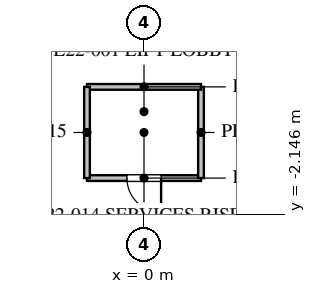
"""IFC4 building model, lengths in metres.
Left out: names, types, materials, properties, quantities, classifications, styles, units other than length and angle.
Written with IfcOpenShell. Run it as: python <this file> out.ifc"""

import sys

from ifc_helpers import new_model, si_unit, direction, frame, frame_2d, origin, place, context, subcontext, project, spatial, rectangle, extrude, element, fill, save


model = new_model("IFC4")
c1 = context("Model", 3, precision=1e-05, world=origin(), true_north=direction((0.0, 1.0)))
c2 = subcontext(c1, "Body", "Model", "MODEL_VIEW")
j1 = project(units=[si_unit("LENGTHUNIT", "METRE"), si_unit("PLANEANGLEUNIT", "RADIAN")], contexts=[c1])
p1 = place(None, origin())
s1 = spatial("IfcSite", under=j1, at=p1, CompositionType="ELEMENT")
p2 = place(p1, origin())
s2 = spatial("IfcBuilding", under=s1, at=p2, CompositionType="ELEMENT")
p3 = place(p2, frame((0.0, 0.0, 98.1)))
s3 = spatial("IfcBuildingStorey", under=s2, at=p3, CompositionType="ELEMENT", Elevation=98.1)
p4 = place(p3, frame((-1.5, -1.2, 0.0), z_axis=(0.0, 0.0, 1.0), x_axis=(1.0, 0.0, 0.0)))
e1 = element("IfcWall", 1, at=p4, inside=s3, PredefinedType="PARTITIONING", context=c2, shape_type="SweptSolid", body=[
    extrude(rectangle(XDim=3.0, YDim=0.15, at=frame_2d((1.5, 0.0))), origin(), (0.0, 0.0, 1.0), 4.8),
])
p5 = place(p4, frame((1.05, 0.0, 0.0)))
e2 = element("IfcOpeningElement", 2, at=p5, cuts=e1, PredefinedType="OPENING", context=c2, shape_type="SweptSolid", body=[
    extrude(rectangle(XDim=0.9, YDim=2.1, at=frame_2d((0.45, 1.05))), frame((0.0, 0.085, 0.0), z_axis=(0.0, -1.0, 0.0), x_axis=(1.0, 0.0, 0.0)), (0.0, 0.0, 1.0), 0.17),
])
p6 = place(p3, frame((1.5, -1.2, 0.0), z_axis=(0.0, 0.0, 1.0), x_axis=(0.0, 1.0, 0.0)))
e3 = element("IfcWall", 3, at=p6, inside=s3, PredefinedType="PARTITIONING", context=c2, shape_type="SweptSolid", body=[
    extrude(rectangle(XDim=2.4, YDim=0.15, at=frame_2d((1.2, 0.0))), origin(), (0.0, 0.0, 1.0), 4.8),
])
p7 = place(p3, frame((1.5, 1.2, 0.0), z_axis=(0.0, 0.0, 1.0), x_axis=(-1.0, 0.0, 0.0)))
e4 = element("IfcWall", 4, at=p7, inside=s3, PredefinedType="PARTITIONING", context=c2, shape_type="SweptSolid", body=[
    extrude(rectangle(XDim=3.0, YDim=0.15, at=frame_2d((1.5, 0.0))), origin(), (0.0, 0.0, 1.0), 4.8),
])
p8 = place(p3, frame((-1.5, 1.2, 0.0), z_axis=(0.0, 0.0, 1.0), x_axis=(0.0, -1.0, 0.0)))
e5 = element("IfcWall", 5, at=p8, inside=s3, PredefinedType="PARTITIONING", context=c2, shape_type="SweptSolid", body=[
    extrude(rectangle(XDim=2.4, YDim=0.15, at=frame_2d((1.2, 0.0))), origin(), (0.0, 0.0, 1.0), 4.8),
])
p9 = place(p5, frame((0.9, 0.0, 0.0), z_axis=(0.0, 0.0, 1.0), x_axis=(-1.0, 0.0, 0.0)))
e6 = element("IfcDoor", 6, at=p9, inside=s3, OperationType="SINGLE_SWING_LEFT", PredefinedType="DOOR", context=c2, shape_type="SweptSolid", body=[
    extrude(rectangle(XDim=0.9, YDim=2.1, at=frame_2d((0.45, 1.05))), frame((0.0, 0.025, 0.0), z_axis=(0.0, -1.0, 0.0), x_axis=(1.0, 0.0, 0.0)), (0.0, 0.0, 1.0), 0.05),
])
fill(e2, e6)
save(model, sys.argv[1])
